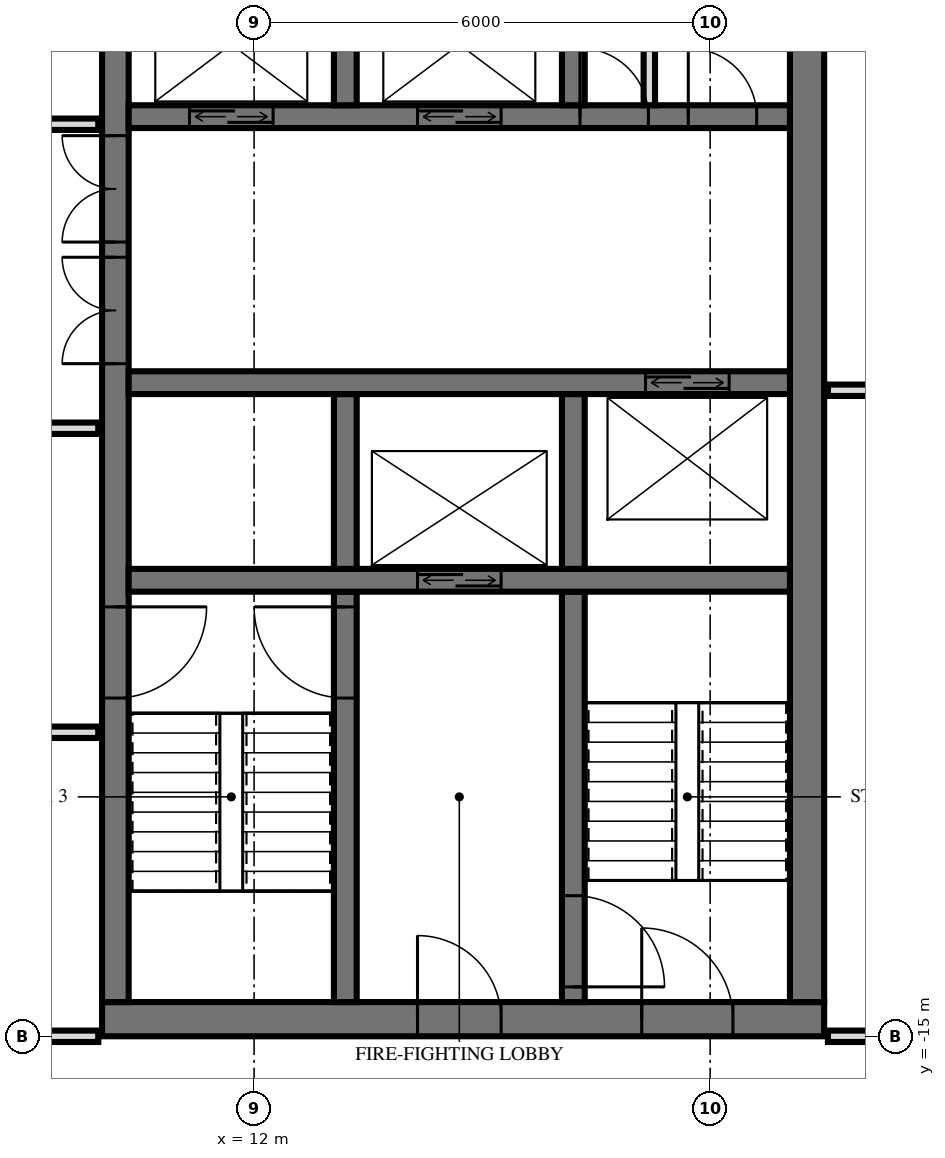
"""IFC4 building model, lengths in metres.
Left out: names, types, materials, properties, quantities, classifications, styles, units other than length and angle.
Written with IfcOpenShell. Run it as: python <this file> out.ifc"""

import sys

from ifc_helpers import new_model, si_unit, direction, frame, frame_2d, origin, place, context, subcontext, project, spatial, rectangle, extrude, element, fill, save


model = new_model("IFC4")
c1 = context("Model", 3, precision=1e-05, world=origin(), true_north=direction((0.0, 1.0)))
c2 = subcontext(c1, "Body", "Model", "MODEL_VIEW")
j1 = project(units=[si_unit("LENGTHUNIT", "METRE"), si_unit("PLANEANGLEUNIT", "RADIAN")], contexts=[c1])
p1 = place(None, origin())
s1 = spatial("IfcSite", under=j1, at=p1, CompositionType="ELEMENT")
p2 = place(p1, origin())
s2 = spatial("IfcBuilding", under=s1, at=p2, CompositionType="ELEMENT")
p3 = place(p2, frame((0.0, 0.0, 298.1)))
s3 = spatial("IfcBuildingStorey", under=s2, at=p3, CompositionType="ELEMENT", Elevation=298.1)
p4 = place(p3, frame((10.0, -14.775, 0.0), z_axis=(0.0, 0.0, 1.0), x_axis=(1.0, 0.0, 0.0)))
e1 = element("IfcWall", 1, at=p4, inside=s3, PredefinedType="SHEAR", context=c2, shape_type="SweptSolid", body=[
    extrude(rectangle(XDim=9.5, YDim=0.45, at=frame_2d((4.75, 0.0))), origin(), (0.0, 0.0, 1.0), 3.5),
])
p5 = place(p4, frame((7.1, 0.0, 0.0)))
e2 = element("IfcOpeningElement", 2, at=p5, cuts=e1, PredefinedType="OPENING", context=c2, shape_type="SweptSolid", body=[
    extrude(rectangle(XDim=1.2, YDim=2.1, at=frame_2d((0.6, 1.05))), frame((0.0, 0.235, 0.0), z_axis=(0.0, -1.0, 0.0), x_axis=(1.0, 0.0, 0.0)), (0.0, 0.0, 1.0), 0.47),
])
p6 = place(p4, frame((4.15, 0.0, 0.0)))
e3 = element("IfcOpeningElement", 3, at=p6, cuts=e1, PredefinedType="OPENING", context=c2, shape_type="SweptSolid", body=[
    extrude(rectangle(XDim=1.1, YDim=2.1, at=frame_2d((0.55, 1.05))), frame((0.0, 0.235, 0.0), z_axis=(0.0, -1.0, 0.0), x_axis=(1.0, 0.0, 0.0)), (0.0, 0.0, 1.0), 0.47),
])
p7 = place(p3, frame((10.175, -14.55, 0.0), z_axis=(0.0, 0.0, 1.0), x_axis=(0.0, 1.0, 0.0)))
e4 = element("IfcWall", 4, at=p7, inside=s3, PredefinedType="SHEAR", context=c2, shape_type="SweptSolid", body=[
    extrude(rectangle(XDim=14.1, YDim=0.35, at=frame_2d((7.05, 0.0))), origin(), (0.0, 0.0, 1.0), 3.5),
])
p8 = place(p7, frame((8.4, 0.0, 0.0)))
e5 = element("IfcOpeningElement", 5, at=p8, cuts=e4, PredefinedType="OPENING", context=c2, shape_type="SweptSolid", body=[
    extrude(rectangle(XDim=1.4, YDim=2.4, at=frame_2d((0.7, 1.2))), frame((0.0, 0.185, 0.0), z_axis=(0.0, -1.0, 0.0), x_axis=(1.0, 0.0, 0.0)), (0.0, 0.0, 1.0), 0.37),
])
p9 = place(p7, frame((10.0, 0.0, 0.0)))
e6 = element("IfcOpeningElement", 6, at=p9, cuts=e4, PredefinedType="OPENING", context=c2, shape_type="SweptSolid", body=[
    extrude(rectangle(XDim=1.4, YDim=2.4, at=frame_2d((0.7, 1.2))), frame((0.0, 0.185, 0.0), z_axis=(0.0, -1.0, 0.0), x_axis=(1.0, 0.0, 0.0)), (0.0, 0.0, 1.0), 0.37),
])
p10 = place(p7, frame((4.0, 0.0, 0.0)))
e7 = element("IfcOpeningElement", 7, at=p10, cuts=e4, PredefinedType="OPENING", context=c2, shape_type="SweptSolid", body=[
    extrude(rectangle(XDim=1.2, YDim=2.1, at=frame_2d((0.6, 1.05))), frame((0.0, 0.185, 0.0), z_axis=(0.0, -1.0, 0.0), x_axis=(1.0, 0.0, 0.0)), (0.0, 0.0, 1.0), 0.37),
])
p11 = place(p3, frame((19.275, -14.55, 0.0), z_axis=(0.0, 0.0, 1.0), x_axis=(0.0, 1.0, 0.0)))
e8 = element("IfcWall", 8, at=p11, inside=s3, PredefinedType="SHEAR", context=c2, shape_type="SweptSolid", body=[
    extrude(rectangle(XDim=14.1, YDim=0.45, at=frame_2d((7.05, 0.0))), origin(), (0.0, 0.0, 1.0), 3.5),
])
p12 = place(p3, frame((10.35, -2.9, 0.0), z_axis=(0.0, 0.0, 1.0), x_axis=(1.0, 0.0, 0.0)))
e9 = element("IfcWall", 9, at=p12, inside=s3, PredefinedType="SHEAR", context=c2, shape_type="SweptSolid", body=[
    extrude(rectangle(XDim=8.7, YDim=0.3, at=frame_2d((4.35, 0.0))), origin(), (0.0, 0.0, 1.0), 3.5),
])
p13 = place(p12, frame((0.8, 0.0, 0.0)))
e10 = element("IfcOpeningElement", 10, at=p13, cuts=e9, PredefinedType="OPENING", context=c2, shape_type="SweptSolid", body=[
    extrude(rectangle(XDim=1.1, YDim=2.1, at=frame_2d((0.55, 1.05))), frame((0.0, 0.16, 0.0), z_axis=(0.0, -1.0, 0.0), x_axis=(1.0, 0.0, 0.0)), (0.0, 0.0, 1.0), 0.32),
])
p14 = place(p12, frame((3.8, 0.0, 0.0)))
e11 = element("IfcOpeningElement", 11, at=p14, cuts=e9, PredefinedType="OPENING", context=c2, shape_type="SweptSolid", body=[
    extrude(rectangle(XDim=1.1, YDim=2.1, at=frame_2d((0.55, 1.05))), frame((0.0, 0.16, 0.0), z_axis=(0.0, -1.0, 0.0), x_axis=(1.0, 0.0, 0.0)), (0.0, 0.0, 1.0), 0.32),
])
p15 = place(p12, frame((5.938, 0.0, 0.0)))
e12 = element("IfcOpeningElement", 12, at=p15, cuts=e9, PredefinedType="OPENING", context=c2, shape_type="SweptSolid", body=[
    extrude(rectangle(XDim=0.9, YDim=2.1, at=frame_2d((0.45, 1.05))), frame((0.0, 0.16, 0.0), z_axis=(0.0, -1.0, 0.0), x_axis=(1.0, 0.0, 0.0)), (0.0, 0.0, 1.0), 0.32),
])
p16 = place(p12, frame((7.363, 0.0, 0.0)))
e13 = element("IfcOpeningElement", 13, at=p16, cuts=e9, PredefinedType="OPENING", context=c2, shape_type="SweptSolid", body=[
    extrude(rectangle(XDim=0.9, YDim=2.1, at=frame_2d((0.45, 1.05))), frame((0.0, 0.16, 0.0), z_axis=(0.0, -1.0, 0.0), x_axis=(1.0, 0.0, 0.0)), (0.0, 0.0, 1.0), 0.32),
])
p17 = place(p3, frame((10.35, -6.4, 0.0), z_axis=(0.0, 0.0, 1.0), x_axis=(1.0, 0.0, 0.0)))
e14 = element("IfcWall", 14, at=p17, inside=s3, PredefinedType="SHEAR", context=c2, shape_type="SweptSolid", body=[
    extrude(rectangle(XDim=8.7, YDim=0.3, at=frame_2d((4.35, 0.0))), origin(), (0.0, 0.0, 1.0), 3.5),
])
p18 = place(p17, frame((6.8, 0.0, 0.0)))
e15 = element("IfcOpeningElement", 15, at=p18, cuts=e14, PredefinedType="OPENING", context=c2, shape_type="SweptSolid", body=[
    extrude(rectangle(XDim=1.1, YDim=2.1, at=frame_2d((0.55, 1.05))), frame((0.0, 0.16, 0.0), z_axis=(0.0, -1.0, 0.0), x_axis=(1.0, 0.0, 0.0)), (0.0, 0.0, 1.0), 0.32),
])
p19 = place(p3, frame((10.35, -9.0, 0.0), z_axis=(0.0, 0.0, 1.0), x_axis=(1.0, 0.0, 0.0)))
e16 = element("IfcWall", 16, at=p19, inside=s3, PredefinedType="SHEAR", context=c2, shape_type="SweptSolid", body=[
    extrude(rectangle(XDim=8.7, YDim=0.3, at=frame_2d((4.35, 0.0))), origin(), (0.0, 0.0, 1.0), 3.5),
])
p20 = place(p19, frame((3.8, 0.0, 0.0)))
e17 = element("IfcOpeningElement", 17, at=p20, cuts=e16, PredefinedType="OPENING", context=c2, shape_type="SweptSolid", body=[
    extrude(rectangle(XDim=1.1, YDim=2.1, at=frame_2d((0.55, 1.05))), frame((0.0, 0.16, 0.0), z_axis=(0.0, -1.0, 0.0), x_axis=(1.0, 0.0, 0.0)), (0.0, 0.0, 1.0), 0.32),
])
for number, where, z_axis, x_axis in (
    (18, (13.2, -2.75, 0.0), (0.0, 0.0, 1.0), (0.0, 1.0, 0.0)),
    (19, (13.2, -8.85, 0.0), (0.0, 0.0, 1.0), (0.0, 1.0, 0.0)),
):
    element("IfcWall", number, at=place(p3, frame(where, z_axis=z_axis, x_axis=x_axis)), inside=s3, PredefinedType="SHEAR", context=c2, shape_type="SweptSolid", body=[
        extrude(rectangle(XDim=2.3, YDim=0.3, at=frame_2d((1.15, 0.0))), origin(), (0.0, 0.0, 1.0), 3.5),
    ])
p21 = place(p3, frame((13.2, -14.55, 0.0), z_axis=(0.0, 0.0, 1.0), x_axis=(0.0, 1.0, 0.0)))
e20 = element("IfcWall", 20, at=p21, inside=s3, PredefinedType="SHEAR", context=c2, shape_type="SweptSolid", body=[
    extrude(rectangle(XDim=5.4, YDim=0.3, at=frame_2d((2.7, 0.0))), origin(), (0.0, 0.0, 1.0), 3.5),
])
p22 = place(p21, frame((4.0, 0.0, 0.0)))
e21 = element("IfcOpeningElement", 21, at=p22, cuts=e20, PredefinedType="OPENING", context=c2, shape_type="SweptSolid", body=[
    extrude(rectangle(XDim=1.2, YDim=2.1, at=frame_2d((0.6, 1.05))), frame((0.0, 0.16, 0.0), z_axis=(0.0, -1.0, 0.0), x_axis=(1.0, 0.0, 0.0)), (0.0, 0.0, 1.0), 0.32),
])
for number, where, z_axis, x_axis in (
    (22, (16.2, -2.75, 0.0), (0.0, 0.0, 1.0), (0.0, 1.0, 0.0)),
    (23, (16.2, -8.85, 0.0), (0.0, 0.0, 1.0), (0.0, 1.0, 0.0)),
):
    element("IfcWall", number, at=place(p3, frame(where, z_axis=z_axis, x_axis=x_axis)), inside=s3, PredefinedType="SHEAR", context=c2, shape_type="SweptSolid", body=[
        extrude(rectangle(XDim=2.3, YDim=0.3, at=frame_2d((1.15, 0.0))), origin(), (0.0, 0.0, 1.0), 3.5),
    ])
p23 = place(p3, frame((16.2, -14.55, 0.0), z_axis=(0.0, 0.0, 1.0), x_axis=(0.0, 1.0, 0.0)))
e24 = element("IfcWall", 24, at=p23, inside=s3, PredefinedType="SHEAR", context=c2, shape_type="SweptSolid", body=[
    extrude(rectangle(XDim=5.4, YDim=0.3, at=frame_2d((2.7, 0.0))), origin(), (0.0, 0.0, 1.0), 3.5),
])
p24 = place(p23, frame((0.2, 0.0, 0.0)))
e25 = element("IfcOpeningElement", 25, at=p24, cuts=e24, PredefinedType="OPENING", context=c2, shape_type="SweptSolid", body=[
    extrude(rectangle(XDim=1.2, YDim=2.1, at=frame_2d((0.6, 1.05))), frame((0.0, 0.16, 0.0), z_axis=(0.0, -1.0, 0.0), x_axis=(1.0, 0.0, 0.0)), (0.0, 0.0, 1.0), 0.32),
])
p25 = place(p3, frame((17.2, -2.75, 0.0), z_axis=(0.0, 0.0, 1.0), x_axis=(0.0, 1.0, 0.0)))
e26 = element("IfcWall", 26, at=p25, inside=s3, PredefinedType="PARTITIONING", context=c2, shape_type="SweptSolid", body=[
    extrude(rectangle(XDim=2.3, YDim=0.15, at=frame_2d((1.15, 0.0))), origin(), (0.0, 0.0, 1.0), 3.2),
])
p26 = place(p3, frame((-9.95, -15.0, 0.0), z_axis=(0.0, 0.0, 1.0), x_axis=(1.0, 0.0, 0.0)))
e27 = element("IfcWall", 27, at=p26, inside=s3, PredefinedType="PARTITIONING", context=c2, shape_type="SweptSolid", body=[
    extrude(rectangle(XDim=19.9, YDim=0.15, at=frame_2d((9.95, 0.0))), origin(), (0.0, 0.0, 1.0), 2.584),
])
p27 = place(p26, frame((9.45, 0.0, 0.0)))
e28 = element("IfcOpeningElement", 28, at=p27, cuts=e27, PredefinedType="OPENING", context=c2, shape_type="SweptSolid", body=[
    extrude(rectangle(XDim=1.0, YDim=2.1, at=frame_2d((0.5, 1.05))), frame((0.0, 0.085, 0.0), z_axis=(0.0, -1.0, 0.0), x_axis=(1.0, 0.0, 0.0)), (0.0, 0.0, 1.0), 0.17),
])
p28 = place(p3, frame((19.55, -15.0, 0.0), z_axis=(0.0, 0.0, 1.0), x_axis=(1.0, 0.0, 0.0)))
e29 = element("IfcWall", 29, at=p28, inside=s3, PredefinedType="PARTITIONING", context=c2, shape_type="SweptSolid", body=[
    extrude(rectangle(XDim=3.37, YDim=0.15, at=frame_2d((1.685, 0.0))), origin(), (0.0, 0.0, 1.0), 3.22),
])
p29 = place(p28, frame((0.9, 0.0, 0.0)))
e30 = element("IfcOpeningElement", 30, at=p29, cuts=e29, PredefinedType="OPENING", context=c2, shape_type="SweptSolid", body=[
    extrude(rectangle(XDim=1.0, YDim=2.1, at=frame_2d((0.5, 1.05))), frame((0.0, 0.085, 0.0), z_axis=(0.0, -1.0, 0.0), x_axis=(1.0, 0.0, 0.0)), (0.0, 0.0, 1.0), 0.17),
])
p30 = place(p3, frame((-9.95, -11.0, 0.0), z_axis=(0.0, 0.0, 1.0), x_axis=(1.0, 0.0, 0.0)))
e31 = element("IfcWall", 31, at=p30, inside=s3, PredefinedType="PARTITIONING", context=c2, shape_type="SweptSolid", body=[
    extrude(rectangle(XDim=19.9, YDim=0.15, at=frame_2d((9.95, 0.0))), origin(), (0.0, 0.0, 1.0), 3.22),
])
p31 = place(p30, frame((9.45, 0.0, 0.0)))
e32 = element("IfcOpeningElement", 32, at=p31, cuts=e31, PredefinedType="OPENING", context=c2, shape_type="SweptSolid", body=[
    extrude(rectangle(XDim=1.0, YDim=2.1, at=frame_2d((0.5, 1.05))), frame((0.0, 0.085, 0.0), z_axis=(0.0, -1.0, 0.0), x_axis=(1.0, 0.0, 0.0)), (0.0, 0.0, 1.0), 0.17),
])
p32 = place(p30, frame((15.45, 0.0, 0.0)))
e33 = element("IfcOpeningElement", 33, at=p32, cuts=e31, PredefinedType="OPENING", context=c2, shape_type="SweptSolid", body=[
    extrude(rectangle(XDim=1.0, YDim=2.1, at=frame_2d((0.5, 1.05))), frame((0.0, 0.085, 0.0), z_axis=(0.0, -1.0, 0.0), x_axis=(1.0, 0.0, 0.0)), (0.0, 0.0, 1.0), 0.17),
])
p33 = place(p3, frame((-9.95, -7.0, 0.0), z_axis=(0.0, 0.0, 1.0), x_axis=(1.0, 0.0, 0.0)))
e34 = element("IfcWall", 34, at=p33, inside=s3, PredefinedType="PARTITIONING", context=c2, shape_type="SweptSolid", body=[
    extrude(rectangle(XDim=19.9, YDim=0.15, at=frame_2d((9.95, 0.0))), origin(), (0.0, 0.0, 1.0), 3.22),
])
p34 = place(p33, frame((9.45, 0.0, 0.0)))
e35 = element("IfcOpeningElement", 35, at=p34, cuts=e34, PredefinedType="OPENING", context=c2, shape_type="SweptSolid", body=[
    extrude(rectangle(XDim=1.0, YDim=2.1, at=frame_2d((0.5, 1.05))), frame((0.0, 0.085, 0.0), z_axis=(0.0, -1.0, 0.0), x_axis=(1.0, 0.0, 0.0)), (0.0, 0.0, 1.0), 0.17),
])
p35 = place(p33, frame((3.45, 0.0, 0.0)))
e36 = element("IfcOpeningElement", 36, at=p35, cuts=e34, PredefinedType="OPENING", context=c2, shape_type="SweptSolid", body=[
    extrude(rectangle(XDim=1.0, YDim=2.1, at=frame_2d((0.5, 1.05))), frame((0.0, 0.085, 0.0), z_axis=(0.0, -1.0, 0.0), x_axis=(1.0, 0.0, 0.0)), (0.0, 0.0, 1.0), 0.17),
])
p36 = place(p3, frame((19.55, -6.5, 0.0), z_axis=(0.0, 0.0, 1.0), x_axis=(1.0, 0.0, 0.0)))
e37 = element("IfcWall", 37, at=p36, inside=s3, PredefinedType="PLUMBINGWALL", context=c2, shape_type="SweptSolid", body=[
    extrude(rectangle(XDim=3.37, YDim=0.15, at=frame_2d((1.685, 0.0))), origin(), (0.0, 0.0, 1.0), 3.22),
])
p37 = place(p36, frame((1.3, 0.0, 0.0)))
e38 = element("IfcOpeningElement", 38, at=p37, cuts=e37, PredefinedType="OPENING", context=c2, shape_type="SweptSolid", body=[
    extrude(rectangle(XDim=0.9, YDim=2.1, at=frame_2d((0.45, 1.05))), frame((0.0, 0.085, 0.0), z_axis=(0.0, -1.0, 0.0), x_axis=(1.0, 0.0, 0.0)), (0.0, 0.0, 1.0), 0.17),
])
p38 = place(p3, frame((-9.95, -3.0, 0.0), z_axis=(0.0, 0.0, 1.0), x_axis=(1.0, 0.0, 0.0)))
e39 = element("IfcWall", 39, at=p38, inside=s3, PredefinedType="PARTITIONING", context=c2, shape_type="SweptSolid", body=[
    extrude(rectangle(XDim=19.9, YDim=0.15, at=frame_2d((9.95, 0.0))), origin(), (0.0, 0.0, 1.0), 3.22),
])
p39 = place(p38, frame((1.45, 0.0, 0.0)))
e40 = element("IfcOpeningElement", 40, at=p39, cuts=e39, PredefinedType="OPENING", context=c2, shape_type="SweptSolid", body=[
    extrude(rectangle(XDim=1.0, YDim=2.1, at=frame_2d((0.5, 1.05))), frame((0.0, 0.085, 0.0), z_axis=(0.0, -1.0, 0.0), x_axis=(1.0, 0.0, 0.0)), (0.0, 0.0, 1.0), 0.17),
])
p40 = place(p38, frame((4.95, 0.0, 0.0)))
e41 = element("IfcOpeningElement", 41, at=p40, cuts=e39, PredefinedType="OPENING", context=c2, shape_type="SweptSolid", body=[
    extrude(rectangle(XDim=1.0, YDim=2.1, at=frame_2d((0.5, 1.05))), frame((0.0, 0.085, 0.0), z_axis=(0.0, -1.0, 0.0), x_axis=(1.0, 0.0, 0.0)), (0.0, 0.0, 1.0), 0.17),
])
p41 = place(p38, frame((7.7, 0.0, 0.0)))
e42 = element("IfcOpeningElement", 42, at=p41, cuts=e39, PredefinedType="OPENING", context=c2, shape_type="SweptSolid", body=[
    extrude(rectangle(XDim=1.0, YDim=2.1, at=frame_2d((0.5, 1.05))), frame((0.0, 0.085, 0.0), z_axis=(0.0, -1.0, 0.0), x_axis=(1.0, 0.0, 0.0)), (0.0, 0.0, 1.0), 0.17),
])
p42 = place(p38, frame((14.2, 0.0, 0.0)))
e43 = element("IfcOpeningElement", 43, at=p42, cuts=e39, PredefinedType="OPENING", context=c2, shape_type="SweptSolid", body=[
    extrude(rectangle(XDim=1.0, YDim=2.1, at=frame_2d((0.5, 1.05))), frame((0.0, 0.085, 0.0), z_axis=(0.0, -1.0, 0.0), x_axis=(1.0, 0.0, 0.0)), (0.0, 0.0, 1.0), 0.17),
])
p43 = place(p13, origin())
e44 = element("IfcDoor", 44, at=p43, inside=s3, OperationType="DOUBLE_DOOR_SLIDING", PredefinedType="USERDEFINED", context=c2, shape_type="SweptSolid", body=[
    extrude(rectangle(XDim=1.1, YDim=2.1, at=frame_2d((0.55, 1.05))), frame((0.0, 0.025, 0.0), z_axis=(0.0, -1.0, 0.0), x_axis=(1.0, 0.0, 0.0)), (0.0, 0.0, 1.0), 0.05),
])
fill(e10, e44)
p44 = place(p14, origin())
e45 = element("IfcDoor", 45, at=p44, inside=s3, OperationType="DOUBLE_DOOR_SLIDING", PredefinedType="USERDEFINED", context=c2, shape_type="SweptSolid", body=[
    extrude(rectangle(XDim=1.1, YDim=2.1, at=frame_2d((0.55, 1.05))), frame((0.0, 0.025, 0.0), z_axis=(0.0, -1.0, 0.0), x_axis=(1.0, 0.0, 0.0)), (0.0, 0.0, 1.0), 0.05),
])
fill(e11, e45)
p45 = place(p20, origin())
e46 = element("IfcDoor", 46, at=p45, inside=s3, OperationType="DOUBLE_DOOR_SLIDING", PredefinedType="USERDEFINED", context=c2, shape_type="SweptSolid", body=[
    extrude(rectangle(XDim=1.1, YDim=2.1, at=frame_2d((0.55, 1.05))), frame((0.0, 0.025, 0.0), z_axis=(0.0, -1.0, 0.0), x_axis=(1.0, 0.0, 0.0)), (0.0, 0.0, 1.0), 0.05),
])
fill(e17, e46)
p46 = place(p18, origin())
e47 = element("IfcDoor", 47, at=p46, inside=s3, OperationType="DOUBLE_DOOR_SLIDING", PredefinedType="USERDEFINED", context=c2, shape_type="SweptSolid", body=[
    extrude(rectangle(XDim=1.1, YDim=2.1, at=frame_2d((0.55, 1.05))), frame((0.0, 0.025, 0.0), z_axis=(0.0, -1.0, 0.0), x_axis=(1.0, 0.0, 0.0)), (0.0, 0.0, 1.0), 0.05),
])
fill(e15, e47)
p47 = place(p8, origin())
e48 = element("IfcDoor", 48, at=p47, inside=s3, OperationType="DOUBLE_DOOR_SINGLE_SWING", PredefinedType="DOOR", context=c2, shape_type="SweptSolid", body=[
    extrude(rectangle(XDim=1.4, YDim=2.4, at=frame_2d((0.7, 1.2))), frame((0.0, 0.025, 0.0), z_axis=(0.0, -1.0, 0.0), x_axis=(1.0, 0.0, 0.0)), (0.0, 0.0, 1.0), 0.05),
])
fill(e5, e48)
p48 = place(p9, origin())
e49 = element("IfcDoor", 49, at=p48, inside=s3, OperationType="DOUBLE_DOOR_SINGLE_SWING", PredefinedType="DOOR", context=c2, shape_type="SweptSolid", body=[
    extrude(rectangle(XDim=1.4, YDim=2.4, at=frame_2d((0.7, 1.2))), frame((0.0, 0.025, 0.0), z_axis=(0.0, -1.0, 0.0), x_axis=(1.0, 0.0, 0.0)), (0.0, 0.0, 1.0), 0.05),
])
fill(e6, e49)
p49 = place(p10, frame((0.6, 0.0, 0.0), z_axis=(0.0, 0.0, 1.0), x_axis=(-1.0, 0.0, 0.0)))
e50 = element("IfcDoor", 50, at=p49, inside=s3, OperationType="SINGLE_SWING_RIGHT", PredefinedType="DOOR", context=c2, shape_type="SweptSolid", body=[
    extrude(rectangle(XDim=1.2, YDim=2.1, at=frame_2d((0.0, 1.05))), frame((0.0, -0.025, 0.0), z_axis=(0.0, 1.0, 0.0), x_axis=(-1.0, 0.0, 0.0)), (0.0, 0.0, 1.0), 0.05),
])
fill(e7, e50)
p50 = place(p5, origin())
e51 = element("IfcDoor", 51, at=p50, inside=s3, OperationType="SINGLE_SWING_RIGHT", PredefinedType="DOOR", context=c2, shape_type="SweptSolid", body=[
    extrude(rectangle(XDim=1.2, YDim=2.1, at=frame_2d((0.6, 1.05))), frame((0.0, 0.025, 0.0), z_axis=(0.0, -1.0, 0.0), x_axis=(1.0, 0.0, 0.0)), (0.0, 0.0, 1.0), 0.05),
])
fill(e2, e51)
p51 = place(p6, origin())
e52 = element("IfcDoor", 52, at=p51, inside=s3, OperationType="SINGLE_SWING_RIGHT", PredefinedType="DOOR", context=c2, shape_type="SweptSolid", body=[
    extrude(rectangle(XDim=1.1, YDim=2.1, at=frame_2d((0.55, 1.05))), frame((0.0, 0.025, 0.0), z_axis=(0.0, -1.0, 0.0), x_axis=(1.0, 0.0, 0.0)), (0.0, 0.0, 1.0), 0.05),
])
fill(e3, e52)
p52 = place(p15, origin())
e53 = element("IfcDoor", 53, at=p52, inside=s3, OperationType="SINGLE_SWING_RIGHT", PredefinedType="DOOR", context=c2, shape_type="SweptSolid", body=[
    extrude(rectangle(XDim=0.9, YDim=2.1, at=frame_2d((0.45, 1.05))), frame((0.0, 0.025, 0.0), z_axis=(0.0, -1.0, 0.0), x_axis=(1.0, 0.0, 0.0)), (0.0, 0.0, 1.0), 0.05),
])
fill(e12, e53)
p53 = place(p16, origin())
e54 = element("IfcDoor", 54, at=p53, inside=s3, OperationType="SINGLE_SWING_RIGHT", PredefinedType="DOOR", context=c2, shape_type="SweptSolid", body=[
    extrude(rectangle(XDim=0.9, YDim=2.1, at=frame_2d((0.45, 1.05))), frame((0.0, 0.025, 0.0), z_axis=(0.0, -1.0, 0.0), x_axis=(1.0, 0.0, 0.0)), (0.0, 0.0, 1.0), 0.05),
])
fill(e13, e54)
p54 = place(p22, origin())
e55 = element("IfcDoor", 55, at=p54, inside=s3, OperationType="SINGLE_SWING_LEFT", PredefinedType="DOOR", context=c2, shape_type="SweptSolid", body=[
    extrude(rectangle(XDim=1.2, YDim=2.1, at=frame_2d((0.6, 1.05))), frame((0.0, 0.025, 0.0), z_axis=(0.0, -1.0, 0.0), x_axis=(1.0, 0.0, 0.0)), (0.0, 0.0, 1.0), 0.05),
])
fill(e21, e55)
p55 = place(p24, frame((0.6, 0.0, 0.0), z_axis=(0.0, 0.0, 1.0), x_axis=(-1.0, 0.0, 0.0)))
e56 = element("IfcDoor", 56, at=p55, inside=s3, OperationType="SINGLE_SWING_LEFT", PredefinedType="DOOR", context=c2, shape_type="SweptSolid", body=[
    extrude(rectangle(XDim=1.2, YDim=2.1, at=frame_2d((0.0, 1.05))), frame((0.0, -0.025, 0.0), z_axis=(0.0, 1.0, 0.0), x_axis=(-1.0, 0.0, 0.0)), (0.0, 0.0, 1.0), 0.05),
])
fill(e25, e56)
save(model, sys.argv[1])
